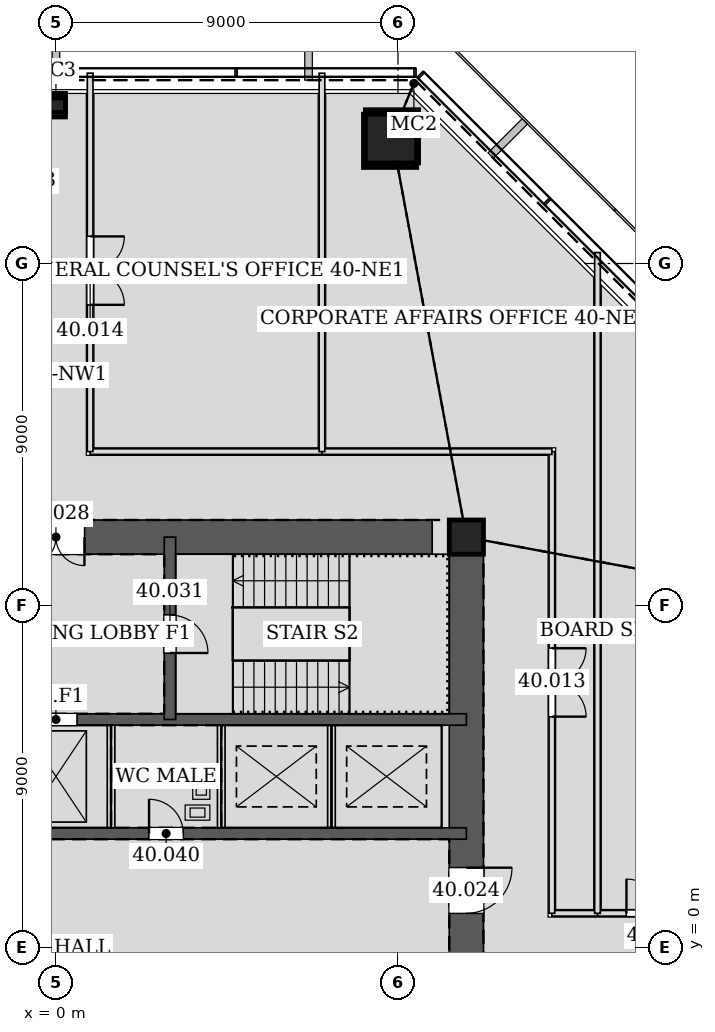
"""IFC4 building model, lengths in metres.
Left out: names, types, materials, properties, quantities, classifications, styles, units other than length and angle.
Written with IfcOpenShell. Run it as: python <this file> out.ifc"""

import sys

from ifc_helpers import new_model, si_unit, direction, frame, frame_2d, origin, origin_2d, place, context, subcontext, project, spatial, rectangle, hollow_rectangle, extrude, element, fill, save


model = new_model("IFC4")
c1 = context("Model", 3, precision=1e-05, world=origin(), true_north=direction((0.0, 1.0)))
c2 = subcontext(c1, "Body", "Model", "MODEL_VIEW")
j1 = project(units=[si_unit("LENGTHUNIT", "METRE"), si_unit("PLANEANGLEUNIT", "RADIAN")], contexts=[c1])
p1 = place(None, origin())
s1 = spatial("IfcSite", under=j1, at=p1, CompositionType="ELEMENT")
p2 = place(p1, origin())
s2 = spatial("IfcBuilding", under=s1, at=p2, CompositionType="ELEMENT")
p3 = place(p2, frame((0.0, 0.0, 176.4)))
s3 = spatial("IfcBuildingStorey", under=s2, at=p3, CompositionType="ELEMENT", Elevation=176.4)
p4 = place(p3, frame((8.842, 21.346, 0.0), z_axis=(-0.011735945751, -0.028294087032, 0.999530746009), x_axis=(0.923693003589, -0.383133442967, 0.0)))
e1 = element("IfcColumn", 1, at=p4, inside=s3, PredefinedType="COLUMN", context=c2, shape_type="SweptSolid", body=[
    extrude(hollow_rectangle(XDim=1.4, YDim=1.4, WallThickness=0.065, at=origin_2d()), origin(), (0.0, 0.0, 1.0), 4.202),
])
p5 = place(p3, frame((0.0, 22.225, 0.0), z_axis=(0.0, -0.02829603574, 0.999599587015), x_axis=(1.0, 0.0, 0.0)))
e2 = element("IfcColumn", 2, at=p5, inside=s3, PredefinedType="COLUMN", context=c2, shape_type="SweptSolid", body=[
    extrude(hollow_rectangle(XDim=0.5, YDim=0.5, WallThickness=0.025, at=origin_2d()), origin(), (0.0, 0.0, 1.0), 4.202),
])
p6 = place(p3, frame((10.8, 10.8, 0.0), z_axis=(0.0, 0.0, 1.0), x_axis=(1.0, 0.0, 0.0)))
e3 = element("IfcColumn", 3, at=p6, inside=s3, PredefinedType="COLUMN", context=c2, shape_type="SweptSolid", body=[
    extrude(hollow_rectangle(XDim=0.9, YDim=0.9, WallThickness=0.06, at=origin_2d()), origin(), (0.0, 0.0, 1.0), 4.2),
])
p7 = place(p3, frame((10.8, -10.8, 0.0), z_axis=(0.0, 0.0, 1.0), x_axis=(0.0, 1.0, 0.0)))
e4 = element("IfcWall", 4, at=p7, inside=s3, PredefinedType="SOLIDWALL", context=c2, shape_type="SweptSolid", body=[
    extrude(rectangle(XDim=21.6, YDim=0.9, at=frame_2d((10.8, 0.0))), origin(), (0.0, 0.0, 1.0), 4.2),
])
p8 = place(p7, frame((11.7, 0.0, 0.0)))
e5 = element("IfcOpeningElement", 5, at=p8, cuts=e4, PredefinedType="OPENING", context=c2, shape_type="SweptSolid", body=[
    extrude(rectangle(XDim=1.2, YDim=2.1, at=frame_2d((0.6, 1.05))), frame((0.0, 0.46, 0.0), z_axis=(0.0, -1.0, 0.0), x_axis=(1.0, 0.0, 0.0)), (0.0, 0.0, 1.0), 0.92),
])
p9 = place(p7, frame((8.7, 0.0, 0.0)))
e6 = element("IfcOpeningElement", 6, at=p9, cuts=e4, PredefinedType="OPENING", context=c2, shape_type="SweptSolid", body=[
    extrude(rectangle(XDim=1.2, YDim=2.1, at=frame_2d((0.6, 1.05))), frame((0.0, 0.46, 0.0), z_axis=(0.0, -1.0, 0.0), x_axis=(1.0, 0.0, 0.0)), (0.0, 0.0, 1.0), 0.92),
])
p10 = place(p3, frame((10.8, 10.8, 0.0), z_axis=(0.0, 0.0, 1.0), x_axis=(-1.0, 0.0, 0.0)))
e7 = element("IfcWall", 7, at=p10, inside=s3, PredefinedType="SOLIDWALL", context=c2, shape_type="SweptSolid", body=[
    extrude(rectangle(XDim=21.6, YDim=0.9, at=frame_2d((10.8, 0.0))), origin(), (0.0, 0.0, 1.0), 4.2),
])
p11 = place(p10, frame((10.05, 0.0, 0.0)))
e8 = element("IfcOpeningElement", 8, at=p11, cuts=e7, PredefinedType="OPENING", context=c2, shape_type="SweptSolid", body=[
    extrude(rectangle(XDim=1.5, YDim=2.1, at=frame_2d((0.75, 1.05))), frame((0.0, 0.46, 0.0), z_axis=(0.0, -1.0, 0.0), x_axis=(1.0, 0.0, 0.0)), (0.0, 0.0, 1.0), 0.92),
])
p12 = place(p3, frame((-10.8, 3.0, 0.0), z_axis=(0.0, 0.0, 1.0), x_axis=(1.0, 0.0, 0.0)))
e9 = element("IfcWall", 9, at=p12, inside=s3, PredefinedType="SOLIDWALL", context=c2, shape_type="SweptSolid", body=[
    extrude(rectangle(XDim=21.6, YDim=0.3, at=frame_2d((10.8, 0.0))), origin(), (0.0, 0.0, 1.0), 4.2),
])
p13 = place(p12, frame((1.65, 0.0, 0.0)))
e10 = element("IfcOpeningElement", 10, at=p13, cuts=e9, PredefinedType="OPENING", context=c2, shape_type="SweptSolid", body=[
    extrude(rectangle(XDim=0.9, YDim=2.1, at=frame_2d((0.45, 1.05))), frame((0.0, 0.16, 0.0), z_axis=(0.0, -1.0, 0.0), x_axis=(1.0, 0.0, 0.0)), (0.0, 0.0, 1.0), 0.32),
])
p14 = place(p12, frame((4.55, 0.0, 0.0)))
e11 = element("IfcOpeningElement", 11, at=p14, cuts=e9, PredefinedType="OPENING", context=c2, shape_type="SweptSolid", body=[
    extrude(rectangle(XDim=0.9, YDim=2.1, at=frame_2d((0.45, 1.05))), frame((0.0, 0.16, 0.0), z_axis=(0.0, -1.0, 0.0), x_axis=(1.0, 0.0, 0.0)), (0.0, 0.0, 1.0), 0.32),
])
p15 = place(p12, frame((7.4, 0.0, 0.0)))
e12 = element("IfcOpeningElement", 12, at=p15, cuts=e9, PredefinedType="OPENING", context=c2, shape_type="SweptSolid", body=[
    extrude(rectangle(XDim=1.0, YDim=2.1, at=frame_2d((0.5, 1.05))), frame((0.0, 0.16, 0.0), z_axis=(0.0, -1.0, 0.0), x_axis=(1.0, 0.0, 0.0)), (0.0, 0.0, 1.0), 0.32),
])
p16 = place(p12, frame((13.25, 0.0, 0.0)))
e13 = element("IfcOpeningElement", 13, at=p16, cuts=e9, PredefinedType="OPENING", context=c2, shape_type="SweptSolid", body=[
    extrude(rectangle(XDim=0.9, YDim=2.1, at=frame_2d((0.45, 1.05))), frame((0.0, 0.16, 0.0), z_axis=(0.0, -1.0, 0.0), x_axis=(1.0, 0.0, 0.0)), (0.0, 0.0, 1.0), 0.32),
])
p17 = place(p3, frame((-10.8, 6.0, 0.0), z_axis=(0.0, 0.0, 1.0), x_axis=(1.0, 0.0, 0.0)))
e14 = element("IfcWall", 14, at=p17, inside=s3, PredefinedType="SOLIDWALL", context=c2, shape_type="SweptSolid", body=[
    extrude(rectangle(XDim=21.6, YDim=0.3, at=frame_2d((10.8, 0.0))), origin(), (0.0, 0.0, 1.0), 4.2),
])
p18 = place(p17, frame((10.25, 0.0, 0.0)))
e15 = element("IfcOpeningElement", 15, at=p18, cuts=e14, PredefinedType="OPENING", context=c2, shape_type="SweptSolid", body=[
    extrude(rectangle(XDim=1.1, YDim=2.1, at=frame_2d((0.55, 1.05))), frame((0.0, 0.16, 0.0), z_axis=(0.0, -1.0, 0.0), x_axis=(1.0, 0.0, 0.0)), (0.0, 0.0, 1.0), 0.32),
])
p19 = place(p3, frame((3.0, 6.0, 0.0), z_axis=(0.0, 0.0, 1.0), x_axis=(0.0, 1.0, 0.0)))
e16 = element("IfcWall", 16, at=p19, inside=s3, PredefinedType="SOLIDWALL", context=c2, shape_type="SweptSolid", body=[
    extrude(rectangle(XDim=4.8, YDim=0.3, at=frame_2d((2.4, 0.0))), origin(), (0.0, 0.0, 1.0), 4.2),
])
p20 = place(p19, frame((1.75, 0.0, 0.0)))
e17 = element("IfcOpeningElement", 17, at=p20, cuts=e16, PredefinedType="OPENING", context=c2, shape_type="SweptSolid", body=[
    extrude(rectangle(XDim=1.0, YDim=2.1, at=frame_2d((0.5, 1.05))), frame((0.0, 0.16, 0.0), z_axis=(0.0, -1.0, 0.0), x_axis=(1.0, 0.0, 0.0)), (0.0, 0.0, 1.0), 0.32),
])
p21 = place(p3, frame((17.576, 0.9, 0.0), z_axis=(0.0, 0.0, 1.0), x_axis=(-1.0, 0.0, 0.0)))
e18 = element("IfcWall", 18, at=p21, inside=s3, PredefinedType="PARTITIONING", context=c2, shape_type="SweptSolid", body=[
    extrude(rectangle(XDim=3.327, YDim=0.15, at=frame_2d((1.663, 0.0))), origin(), (0.0, 0.0, 1.0), 3.499),
])
p22 = place(p21, frame((0.763, 0.0, 0.0)))
e19 = element("IfcOpeningElement", 19, at=p22, cuts=e18, PredefinedType="OPENING", context=c2, shape_type="SweptSolid", body=[
    extrude(rectangle(XDim=1.8, YDim=2.4, at=frame_2d((0.9, 1.2))), frame((0.0, 0.085, 0.0), z_axis=(0.0, -1.0, 0.0), x_axis=(1.0, 0.0, 0.0)), (0.0, 0.0, 1.0), 0.17),
])
p23 = place(p3, frame((14.251, 0.9, 0.0), z_axis=(0.0, 0.0, 1.0), x_axis=(-1.0, 0.0, 0.0)))
e20 = element("IfcWall", 20, at=p23, inside=s3, PredefinedType="PARTITIONING", context=c2, shape_type="SweptSolid", body=[
    extrude(rectangle(XDim=1.201, YDim=0.15, at=frame_2d((0.601, 0.0))), origin(), (0.0, 0.0, 1.0), 3.426),
])
p24 = place(p3, frame((13.05, 0.9, 0.0), z_axis=(0.0, 0.0, 1.0), x_axis=(0.0, 1.0, 0.0)))
e21 = element("IfcWall", 21, at=p24, inside=s3, PredefinedType="PARTITIONING", context=c2, shape_type="SweptSolid", body=[
    extrude(rectangle(XDim=12.15, YDim=0.15, at=frame_2d((6.075, 0.0))), origin(), (0.0, 0.0, 1.0), 3.098),
])
p25 = place(p24, frame((5.175, 0.0, 0.0)))
e22 = element("IfcOpeningElement", 22, at=p25, cuts=e21, PredefinedType="OPENING", context=c2, shape_type="SweptSolid", body=[
    extrude(rectangle(XDim=1.8, YDim=2.4, at=frame_2d((0.9, 1.2))), frame((0.0, 0.085, 0.0), z_axis=(0.0, -1.0, 0.0), x_axis=(1.0, 0.0, 0.0)), (0.0, 0.0, 1.0), 0.17),
])
p26 = place(p3, frame((13.05, 13.05, 0.0), z_axis=(0.0, 0.0, 1.0), x_axis=(-1.0, 0.0, 0.0)))
e23 = element("IfcWall", 23, at=p26, inside=s3, PredefinedType="PARTITIONING", context=c2, shape_type="SweptSolid", body=[
    extrude(rectangle(XDim=6.051, YDim=0.15, at=frame_2d((3.025, 0.0))), origin(), (0.0, 0.0, 1.0), 3.098),
])
p27 = place(p3, frame((7.001, 13.05, 0.0), z_axis=(0.0, 0.0, 1.0), x_axis=(-1.0, 0.0, 0.0)))
e24 = element("IfcWall", 24, at=p27, inside=s3, PredefinedType="PARTITIONING", context=c2, shape_type="SweptSolid", body=[
    extrude(rectangle(XDim=6.101, YDim=0.15, at=frame_2d((3.051, 0.0))), origin(), (0.0, 0.0, 1.0), 4.035),
])
p28 = place(p3, frame((0.9, 13.05, 0.0), z_axis=(0.0, 0.0, 1.0), x_axis=(0.0, 1.0, 0.0)))
e25 = element("IfcWall", 25, at=p28, inside=s3, PredefinedType="PARTITIONING", context=c2, shape_type="SweptSolid", body=[
    extrude(rectangle(XDim=9.958, YDim=0.15, at=frame_2d((4.979, 0.0))), origin(), (0.0, 0.0, 1.0), 3.426),
])
p29 = place(p28, frame((3.862, 0.0, 0.0)))
e26 = element("IfcOpeningElement", 26, at=p29, cuts=e25, PredefinedType="OPENING", context=c2, shape_type="SweptSolid", body=[
    extrude(rectangle(XDim=1.8, YDim=2.4, at=frame_2d((0.9, 1.2))), frame((0.0, 0.085, 0.0), z_axis=(0.0, -1.0, 0.0), x_axis=(1.0, 0.0, 0.0)), (0.0, 0.0, 1.0), 0.17),
])
p30 = place(p3, frame((14.25, 18.288, 0.0), z_axis=(0.0, 0.0, 1.0), x_axis=(0.0, -1.0, 0.0)))
e27 = element("IfcWall", 27, at=p30, inside=s3, PredefinedType="PARTITIONING", context=c2, shape_type="SweptSolid", body=[
    extrude(rectangle(XDim=17.388, YDim=0.15, at=frame_2d((8.694, 0.0))), origin(), (0.0, 0.0, 1.0), 3.098),
])
p31 = place(p3, frame((7.0, 23.007, 0.0), z_axis=(0.0, 0.0, 1.0), x_axis=(0.0, -1.0, 0.0)))
e28 = element("IfcWall", 28, at=p31, inside=s3, PredefinedType="PARTITIONING", context=c2, shape_type="SweptSolid", body=[
    extrude(rectangle(XDim=9.957, YDim=0.15, at=frame_2d((4.978, 0.0))), origin(), (0.0, 0.0, 1.0), 3.426),
])
for number, where, z_axis, x_axis in (
    (29, (1.45, 3.15, 0.0), (0.0, 0.0, 1.0), (0.0, 1.0, 0.0)),
    (30, (4.35, 3.15, 0.0), (0.0, 0.0, 1.0), (0.0, 1.0, 0.0)),
):
    element("IfcWall", number, at=place(p3, frame(where, z_axis=z_axis, x_axis=x_axis)), inside=s3, PredefinedType="PARTITIONING", context=c2, shape_type="SweptSolid", body=[
        extrude(rectangle(XDim=2.7, YDim=0.2, at=frame_2d((1.35, 0.0))), origin(), (0.0, 0.0, 1.0), 4.035),
    ])
p32 = place(p3, frame((7.25, 3.15, 0.0), z_axis=(0.0, 0.0, 1.0), x_axis=(0.0, 1.0, 0.0)))
e31 = element("IfcWall", 31, at=p32, inside=s3, PredefinedType="PARTITIONING", context=c2, shape_type="SweptSolid", body=[
    extrude(rectangle(XDim=2.7, YDim=0.2, at=frame_2d((1.35, 0.0))), origin(), (0.0, 0.0, 1.0), 4.2),
])
p33 = place(p22, frame((1.8, 0.0, 0.0), z_axis=(0.0, 0.0, 1.0), x_axis=(-1.0, 0.0, 0.0)))
e32 = element("IfcDoor", 32, at=p33, inside=s3, OperationType="DOUBLE_DOOR_SINGLE_SWING", PredefinedType="DOOR", context=c2, shape_type="SweptSolid", body=[
    extrude(rectangle(XDim=1.8, YDim=2.4, at=frame_2d((0.9, 1.2))), frame((0.0, 0.025, 0.0), z_axis=(0.0, -1.0, 0.0), x_axis=(1.0, 0.0, 0.0)), (0.0, 0.0, 1.0), 0.05),
])
fill(e19, e32)
p34 = place(p25, frame((1.8, 0.0, 0.0), z_axis=(0.0, 0.0, 1.0), x_axis=(-1.0, 0.0, 0.0)))
e33 = element("IfcDoor", 33, at=p34, inside=s3, OperationType="DOUBLE_DOOR_SINGLE_SWING", PredefinedType="DOOR", context=c2, shape_type="SweptSolid", body=[
    extrude(rectangle(XDim=1.8, YDim=2.4, at=frame_2d((0.9, 1.2))), frame((0.0, 0.025, 0.0), z_axis=(0.0, -1.0, 0.0), x_axis=(1.0, 0.0, 0.0)), (0.0, 0.0, 1.0), 0.05),
])
fill(e22, e33)
p35 = place(p29, frame((1.8, 0.0, 0.0), z_axis=(0.0, 0.0, 1.0), x_axis=(-1.0, 0.0, 0.0)))
e34 = element("IfcDoor", 34, at=p35, inside=s3, OperationType="DOUBLE_DOOR_SINGLE_SWING", PredefinedType="DOOR", context=c2, shape_type="SweptSolid", body=[
    extrude(rectangle(XDim=1.8, YDim=2.4, at=frame_2d((0.9, 1.2))), frame((0.0, 0.025, 0.0), z_axis=(0.0, -1.0, 0.0), x_axis=(1.0, 0.0, 0.0)), (0.0, 0.0, 1.0), 0.05),
])
fill(e26, e34)
p36 = place(p8, frame((1.2, 0.0, 0.0), z_axis=(0.0, 0.0, 1.0), x_axis=(-1.0, 0.0, 0.0)))
e35 = element("IfcDoor", 35, at=p36, inside=s3, OperationType="SINGLE_SWING_LEFT", PredefinedType="DOOR", context=c2, shape_type="SweptSolid", body=[
    extrude(rectangle(XDim=1.2, YDim=2.1, at=frame_2d((0.6, 1.05))), frame((0.0, 0.025, 0.0), z_axis=(0.0, -1.0, 0.0), x_axis=(1.0, 0.0, 0.0)), (0.0, 0.0, 1.0), 0.05),
])
fill(e5, e35)
p37 = place(p11, origin())
e36 = element("IfcDoor", 36, at=p37, inside=s3, OperationType="DOUBLE_DOOR_SINGLE_SWING", PredefinedType="DOOR", context=c2, shape_type="SweptSolid", body=[
    extrude(rectangle(XDim=1.5, YDim=2.1, at=frame_2d((0.75, 1.05))), frame((0.0, 0.025, 0.0), z_axis=(0.0, -1.0, 0.0), x_axis=(1.0, 0.0, 0.0)), (0.0, 0.0, 1.0), 0.05),
])
fill(e8, e36)
p38 = place(p20, frame((1.0, 0.0, 0.0), z_axis=(0.0, 0.0, 1.0), x_axis=(-1.0, 0.0, 0.0)))
e37 = element("IfcDoor", 37, at=p38, inside=s3, OperationType="SINGLE_SWING_RIGHT", PredefinedType="DOOR", context=c2, shape_type="SweptSolid", body=[
    extrude(rectangle(XDim=1.0, YDim=2.1, at=frame_2d((0.5, 1.05))), frame((0.0, 0.025, 0.0), z_axis=(0.0, -1.0, 0.0), x_axis=(1.0, 0.0, 0.0)), (0.0, 0.0, 1.0), 0.05),
])
fill(e17, e37)
p39 = place(p16, origin())
e38 = element("IfcDoor", 38, at=p39, inside=s3, OperationType="SINGLE_SWING_LEFT", PredefinedType="DOOR", context=c2, shape_type="SweptSolid", body=[
    extrude(rectangle(XDim=0.9, YDim=2.1, at=frame_2d((0.45, 1.05))), frame((0.0, 0.025, 0.0), z_axis=(0.0, -1.0, 0.0), x_axis=(1.0, 0.0, 0.0)), (0.0, 0.0, 1.0), 0.05),
])
fill(e13, e38)
p40 = place(p18, origin())
e39 = element("IfcDoor", 39, at=p40, inside=s3, OperationType="DOUBLE_DOOR_SLIDING", PredefinedType="DOOR", context=c2, shape_type="SweptSolid", body=[
    extrude(rectangle(XDim=1.1, YDim=2.1, at=frame_2d((0.55, 1.05))), frame((0.0, 0.025, 0.0), z_axis=(0.0, -1.0, 0.0), x_axis=(1.0, 0.0, 0.0)), (0.0, 0.0, 1.0), 0.05),
])
fill(e15, e39)
save(model, sys.argv[1])
